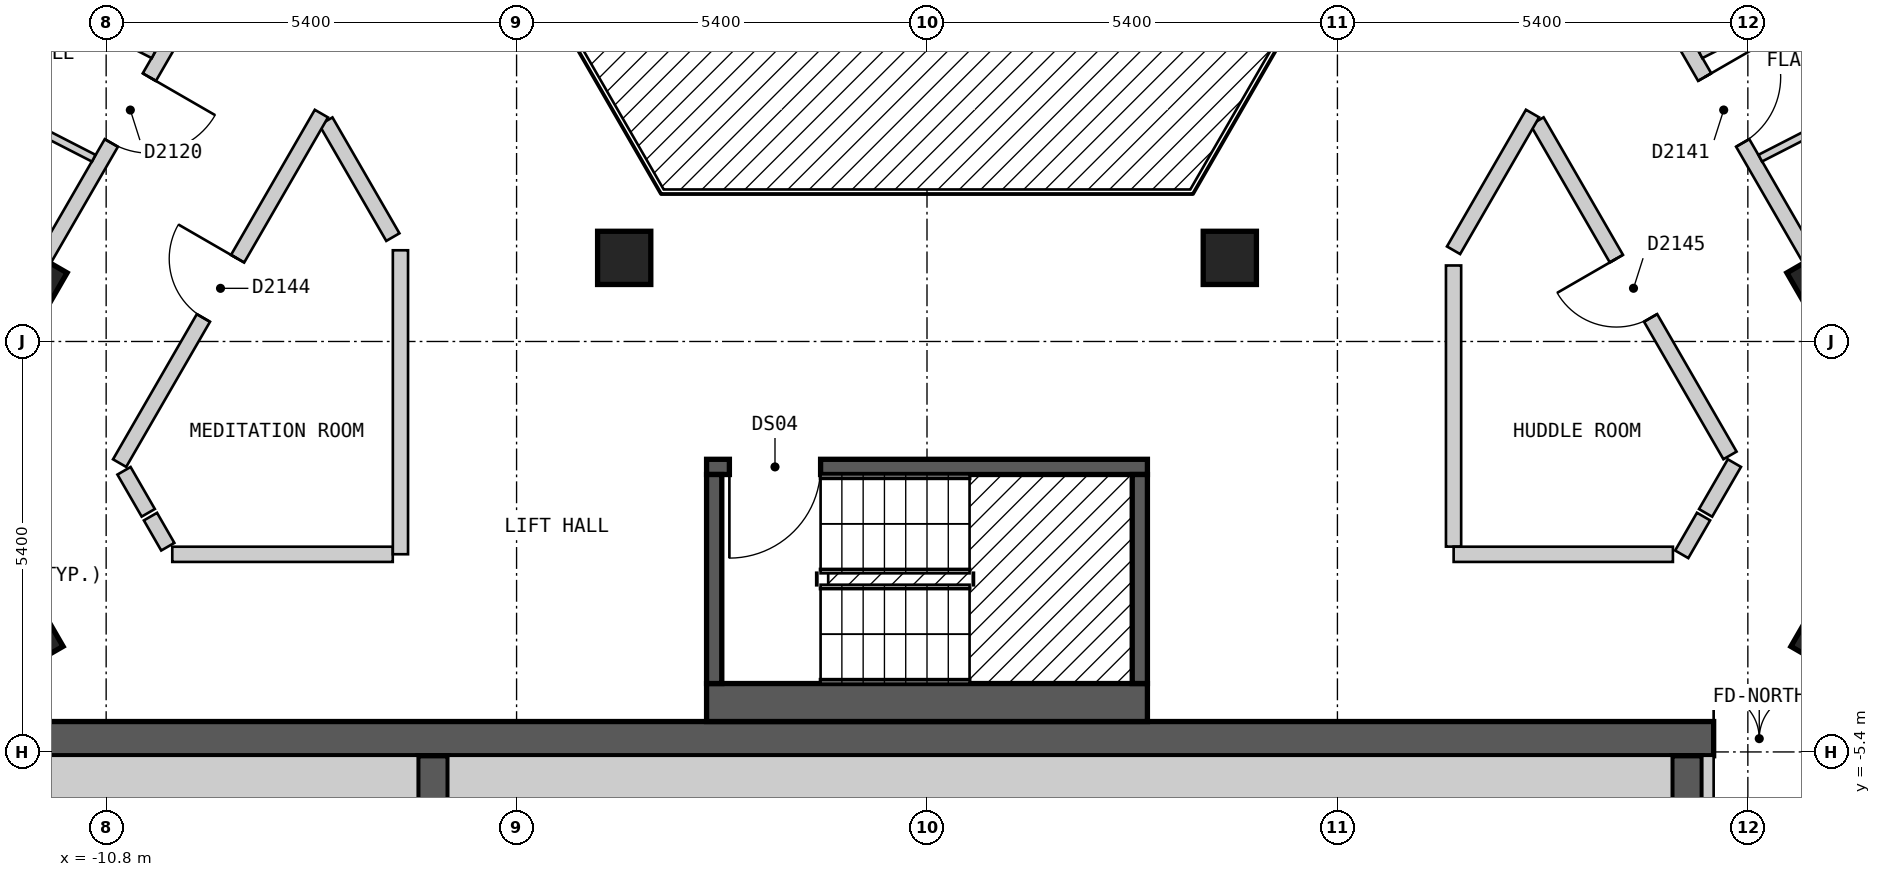
"""IFC4 building model, lengths in metres.
Left out: names, types, materials, properties, quantities, classifications, styles, units other than length and angle.
Written with IfcOpenShell. Run it as: python <this file> out.ifc"""

import sys

from ifc_helpers import new_model, si_unit, direction, frame, frame_2d, origin, origin_2d, place, context, subcontext, project, spatial, rectangle, extrude, element, fill, save


model = new_model("IFC4")
c1 = context("Model", 3, precision=1e-05, world=origin(), true_north=direction((0.0, 1.0)))
c2 = subcontext(c1, "Body", "Model", "MODEL_VIEW")
j1 = project(units=[si_unit("LENGTHUNIT", "METRE"), si_unit("PLANEANGLEUNIT", "RADIAN")], contexts=[c1])
p1 = place(None, origin())
s1 = spatial("IfcSite", under=j1, at=p1, CompositionType="ELEMENT")
p2 = place(p1, origin())
s2 = spatial("IfcBuilding", under=s1, at=p2, CompositionType="ELEMENT")
p3 = place(p2, frame((0.0, 0.0, 217.8)))
s3 = spatial("IfcBuildingStorey", under=s2, at=p3, CompositionType="ELEMENT", Elevation=217.8)
for number, where, z_axis, x_axis in (
    (1, (-11.845, -3.883, 0.0), (0.0, 0.0, 1.0), (0.5, -0.866, 0.0)),
    (2, (11.845, -3.884, 0.0), (0.0, 0.0, 1.0), (0.5, 0.866, 0.0)),
    (3, (11.792, 0.775, 0.0), (0.0, 0.0, 1.0), (-0.5, 0.866, 0.0)),
    (4, (3.984, 1.1, 0.0), (0.0, 0.0, 1.0), (1.0, 0.0, 0.0)),
    (5, (-3.984, 1.1, 0.0), (0.0, 0.0, 1.0), (1.0, 0.0, 0.0)),
    (6, (-11.792, 0.775, 0.0), (0.0, 0.0, 1.0), (-0.5, -0.866, 0.0)),
):
    element("IfcColumn", number, at=place(p3, frame(where, z_axis=z_axis, x_axis=x_axis)), inside=s3, PredefinedType="COLUMN", context=c2, shape_type="SweptSolid", body=[
        extrude(rectangle(XDim=0.7, YDim=0.7, at=origin_2d()), origin(), (0.0, 0.0, 1.0), 3.0),
    ])
p4 = place(p3, frame((-13.3, -5.225, 0.0), z_axis=(0.0, 0.0, 1.0), x_axis=(1.0, 0.0, 0.0)))
e7 = element("IfcWall", 7, at=p4, inside=s3, PredefinedType="SHEAR", context=c2, shape_type="SweptSolid", body=[
    extrude(rectangle(XDim=26.6, YDim=0.45, at=frame_2d((13.3, 0.0))), origin(), (0.0, 0.0, 1.0), 2.7),
])
p5 = place(p4, frame((23.65, 0.0, 0.0)))
e8 = element("IfcOpeningElement", 8, at=p5, cuts=e7, PredefinedType="OPENING", context=c2, shape_type="SweptSolid", body=[
    extrude(rectangle(XDim=1.2, YDim=2.1, at=frame_2d((0.6, 1.05))), frame((0.0, 0.235, 0.0), z_axis=(0.0, -1.0, 0.0), x_axis=(1.0, 0.0, 0.0)), (0.0, 0.0, 1.0), 0.47),
])
for number, where, z_axis, x_axis in (
    (9, (-6.5, -9.15, 0.0), (0.0, 0.0, 1.0), (0.0, 1.0, 0.0)),
    (10, (10.0, -9.15, 0.0), (0.0, 0.0, 1.0), (0.0, 1.0, 0.0)),
):
    element("IfcWall", number, at=place(p3, frame(where, z_axis=z_axis, x_axis=x_axis)), inside=s3, PredefinedType="SHEAR", context=c2, shape_type="SweptSolid", body=[
        extrude(rectangle(XDim=3.7, YDim=0.4, at=frame_2d((1.85, 0.0))), origin(), (0.0, 0.0, 1.0), 2.7),
    ])
p6 = place(p3, frame((-2.9, -4.75, 0.0), z_axis=(0.0, 0.0, 1.0), x_axis=(1.0, 0.0, 0.0)))
e11 = element("IfcWall", 11, at=p6, inside=s3, PredefinedType="SOLIDWALL", context=c2, shape_type="SweptSolid", body=[
    extrude(rectangle(XDim=5.8, YDim=0.5, at=frame_2d((2.9, 0.0))), origin(), (0.0, 0.0, 1.0), 2.7),
])
p7 = place(p3, frame((-2.9, -1.65, 0.0), z_axis=(0.0, 0.0, 1.0), x_axis=(1.0, 0.0, 0.0)))
e12 = element("IfcWall", 12, at=p7, inside=s3, PredefinedType="SOLIDWALL", context=c2, shape_type="SweptSolid", body=[
    extrude(rectangle(XDim=5.8, YDim=0.2, at=frame_2d((2.9, 0.0))), origin(), (0.0, 0.0, 1.0), 2.7),
])
p8 = place(p7, frame((0.3, 0.0, 0.0)))
e13 = element("IfcOpeningElement", 13, at=p8, cuts=e12, PredefinedType="OPENING", context=c2, shape_type="SweptSolid", body=[
    extrude(rectangle(XDim=1.2, YDim=2.1, at=frame_2d((0.6, 1.05))), frame((0.0, 0.11, 0.0), z_axis=(0.0, -1.0, 0.0), x_axis=(1.0, 0.0, 0.0)), (0.0, 0.0, 1.0), 0.22),
])
for number, where, z_axis, x_axis in (
    (14, (-2.8, -4.5, 0.0), (0.0, 0.0, 1.0), (0.0, 1.0, 0.0)),
    (15, (2.8, -4.5, 0.0), (0.0, 0.0, 1.0), (0.0, 1.0, 0.0)),
):
    element("IfcWall", number, at=place(p3, frame(where, z_axis=z_axis, x_axis=x_axis)), inside=s3, PredefinedType="SOLIDWALL", context=c2, shape_type="SweptSolid", body=[
        extrude(rectangle(XDim=2.75, YDim=0.2, at=frame_2d((1.375, 0.0))), origin(), (0.0, 0.0, 1.0), 2.7),
    ])
p9 = place(p3, frame((-7.909, 2.898, 0.0), z_axis=(0.0, 0.0, 1.0), x_axis=(0.50019444547, -0.865913111531, 0.0)))
e16 = element("IfcWall", 16, at=p9, inside=s3, PredefinedType="PARTITIONING", context=c2, shape_type="SweptSolid", body=[
    extrude(rectangle(XDim=1.761, YDim=0.2, at=frame_2d((0.88, 0.0))), origin(), (0.0, 0.0, 1.0), 2.7),
])
p10 = place(p3, frame((-10.565, -1.701, 0.0), z_axis=(0.0, 0.0, 1.0), x_axis=(0.499512735409, -0.866306543416, 0.0)))
e17 = element("IfcWall", 17, at=p10, inside=s3, PredefinedType="PARTITIONING", context=c2, shape_type="SweptSolid", body=[
    extrude(rectangle(XDim=0.638, YDim=0.2, at=frame_2d((0.319, 0.0))), origin(), (0.0, 0.0, 1.0), 2.7),
])
p11 = place(p3, frame((-10.217, -2.304, 0.0), z_axis=(0.0, 0.0, 1.0), x_axis=(0.499013081552, -0.866594452117, 0.0)))
e18 = element("IfcWall", 18, at=p11, inside=s3, PredefinedType="PARTITIONING", context=c2, shape_type="SweptSolid", body=[
    extrude(rectangle(XDim=0.457, YDim=0.2, at=frame_2d((0.229, 0.0))), origin(), (0.0, 0.0, 1.0), 2.7),
])
p12 = place(p3, frame((8.026, 2.899, 0.0), z_axis=(0.0, 0.0, 1.0), x_axis=(0.499986018985, -0.866033475577, 0.0)))
e19 = element("IfcWall", 19, at=p12, inside=s3, PredefinedType="PARTITIONING", context=c2, shape_type="SweptSolid", body=[
    extrude(rectangle(XDim=5.078, YDim=0.2, at=frame_2d((2.539, 0.0))), origin(), (0.0, 0.0, 1.0), 2.7),
])
p13 = place(p12, frame((2.089, 0.0, 0.0)))
e20 = element("IfcOpeningElement", 20, at=p13, cuts=e19, PredefinedType="OPENING", context=c2, shape_type="SweptSolid", body=[
    extrude(rectangle(XDim=0.9, YDim=2.1, at=frame_2d((0.45, 1.05))), frame((0.0, 0.11, 0.0), z_axis=(0.0, -1.0, 0.0), x_axis=(1.0, 0.0, 0.0)), (0.0, 0.0, 1.0), 0.22),
])
p14 = place(p3, frame((9.238, 5.2, 0.0), z_axis=(0.0, 0.0, 1.0), x_axis=(0.500025705601, -0.86601056214, 0.0)))
e21 = element("IfcWall", 21, at=p14, inside=s3, PredefinedType="PARTITIONING", context=c2, shape_type="SweptSolid", body=[
    extrude(rectangle(XDim=7.735, YDim=0.2, at=frame_2d((3.868, 0.0))), origin(), (0.0, 0.0, 1.0), 2.7),
])
p15 = place(p14, frame((6.705, 0.0, 0.0)))
e22 = element("IfcOpeningElement", 22, at=p15, cuts=e21, PredefinedType="OPENING", context=c2, shape_type="SweptSolid", body=[
    extrude(rectangle(XDim=1.0, YDim=2.1, at=frame_2d((0.5, 1.05))), frame((0.0, 0.11, 0.0), z_axis=(0.0, -1.0, 0.0), x_axis=(1.0, 0.0, 0.0)), (0.0, 0.0, 1.0), 0.22),
])
p16 = place(p14, frame((1.988, 0.0, 0.0)))
e23 = element("IfcOpeningElement", 23, at=p16, cuts=e21, PredefinedType="OPENING", context=c2, shape_type="SweptSolid", body=[
    extrude(rectangle(XDim=1.0, YDim=2.1, at=frame_2d((0.5, 1.05))), frame((0.0, 0.11, 0.0), z_axis=(0.0, -1.0, 0.0), x_axis=(1.0, 0.0, 0.0)), (0.0, 0.0, 1.0), 0.22),
])
p17 = place(p3, frame((6.928, 1.0, 0.0), z_axis=(0.0, 0.0, 1.0), x_axis=(0.0, -1.0, 0.0)))
e24 = element("IfcWall", 24, at=p17, inside=s3, PredefinedType="PARTITIONING", context=c2, shape_type="SweptSolid", body=[
    extrude(rectangle(XDim=3.699, YDim=0.2, at=frame_2d((1.85, 0.0))), origin(), (0.0, 0.0, 1.0), 2.7),
])
p18 = place(p3, frame((-9.93, -2.8, 0.0), z_axis=(0.0, 0.0, 1.0), x_axis=(1.0, 0.0, 0.0)))
e25 = element("IfcWall", 25, at=p18, inside=s3, PredefinedType="PARTITIONING", context=c2, shape_type="SweptSolid", body=[
    extrude(rectangle(XDim=2.901, YDim=0.2, at=frame_2d((1.45, 0.0))), origin(), (0.0, 0.0, 1.0), 2.7),
])
p19 = place(p3, frame((6.929, -2.8, 0.0), z_axis=(0.0, 0.0, 1.0), x_axis=(1.0, 0.0, 0.0)))
e26 = element("IfcWall", 26, at=p19, inside=s3, PredefinedType="PARTITIONING", context=c2, shape_type="SweptSolid", body=[
    extrude(rectangle(XDim=2.885, YDim=0.2, at=frame_2d((1.442, 0.0))), origin(), (0.0, 0.0, 1.0), 2.7),
])
p20 = place(p3, frame((6.928, 1.2, 0.0), z_axis=(0.0, 0.0, 1.0), x_axis=(0.500132712588, 0.865948768577, 0.0)))
e27 = element("IfcWall", 27, at=p20, inside=s3, PredefinedType="PARTITIONING", context=c2, shape_type="SweptSolid", body=[
    extrude(rectangle(XDim=2.078, YDim=0.2, at=frame_2d((1.039, 0.0))), origin(), (0.0, 0.0, 1.0), 2.7),
])
p21 = place(p3, frame((9.93, -2.8, 0.0), z_axis=(0.0, 0.0, 1.0), x_axis=(0.500164219654, 0.865930570761, 0.0)))
e28 = element("IfcWall", 28, at=p21, inside=s3, PredefinedType="PARTITIONING", context=c2, shape_type="SweptSolid", body=[
    extrude(rectangle(XDim=0.574, YDim=0.2, at=frame_2d((0.287, 0.0))), origin(), (0.0, 0.0, 1.0), 2.7),
])
p22 = place(p3, frame((10.244, -2.255, 0.0), z_axis=(0.0, 0.0, 1.0), x_axis=(0.50109986513, 0.865389464442, 0.0)))
e29 = element("IfcWall", 29, at=p22, inside=s3, PredefinedType="PARTITIONING", context=c2, shape_type="SweptSolid", body=[
    extrude(rectangle(XDim=0.757, YDim=0.2, at=frame_2d((0.378, 0.0))), origin(), (0.0, 0.0, 1.0), 2.7),
])
p23 = place(p3, frame((-10.623, -1.6, 0.0), z_axis=(0.0, 0.0, 1.0), x_axis=(0.500040865889, 0.866001808567, 0.0)))
e30 = element("IfcWall", 30, at=p23, inside=s3, PredefinedType="PARTITIONING", context=c2, shape_type="SweptSolid", body=[
    extrude(rectangle(XDim=5.31, YDim=0.2, at=frame_2d((2.655, 0.0))), origin(), (0.0, 0.0, 1.0), 2.7),
])
p24 = place(p23, frame((2.205, 0.0, 0.0)))
e31 = element("IfcOpeningElement", 31, at=p24, cuts=e30, PredefinedType="OPENING", context=c2, shape_type="SweptSolid", body=[
    extrude(rectangle(XDim=0.9, YDim=2.1, at=frame_2d((0.45, 1.05))), frame((0.0, 0.11, 0.0), z_axis=(0.0, -1.0, 0.0), x_axis=(1.0, 0.0, 0.0)), (0.0, 0.0, 1.0), 0.22),
])
p25 = place(p3, frame((-13.106, -1.5, 0.0), z_axis=(0.0, 0.0, 1.0), x_axis=(0.500025705601, 0.86601056214, 0.0)))
e32 = element("IfcWall", 32, at=p25, inside=s3, PredefinedType="PARTITIONING", context=c2, shape_type="SweptSolid", body=[
    extrude(rectangle(XDim=7.735, YDim=0.2, at=frame_2d((3.868, 0.0))), origin(), (0.0, 0.0, 1.0), 2.7),
])
p26 = place(p25, frame((4.748, 0.0, 0.0)))
e33 = element("IfcOpeningElement", 33, at=p26, cuts=e32, PredefinedType="OPENING", context=c2, shape_type="SweptSolid", body=[
    extrude(rectangle(XDim=1.0, YDim=2.1, at=frame_2d((0.5, 1.05))), frame((0.0, 0.11, 0.0), z_axis=(0.0, -1.0, 0.0), x_axis=(1.0, 0.0, 0.0)), (0.0, 0.0, 1.0), 0.22),
])
p27 = place(p3, frame((-6.928, -2.799, 0.0), z_axis=(0.0, 0.0, 1.0), x_axis=(0.0, 1.0, 0.0)))
e34 = element("IfcWall", 34, at=p27, inside=s3, PredefinedType="PARTITIONING", context=c2, shape_type="SweptSolid", body=[
    extrude(rectangle(XDim=3.999, YDim=0.2, at=frame_2d((2.0, 0.0))), origin(), (0.0, 0.0, 1.0), 2.7),
])
p28 = place(p3, frame((-12.917, 5.177, 0.0), z_axis=(0.0, 0.0, 1.0), x_axis=(0.889829844516, -0.456292502467, 0.0)))
e35 = element("IfcWall", 35, at=p28, inside=s3, PredefinedType="PARTITIONING", context=c2, shape_type="SweptSolid", body=[
    extrude(rectangle(XDim=3.079, YDim=0.1, at=frame_2d((1.54, 0.0))), origin(), (0.0, 0.0, 1.0), 2.7),
])
p29 = place(p28, frame((1.114, 0.0, 0.0)))
e36 = element("IfcOpeningElement", 36, at=p29, cuts=e35, PredefinedType="OPENING", context=c2, shape_type="SweptSolid", body=[
    extrude(rectangle(XDim=0.9, YDim=2.1, at=frame_2d((0.45, 1.05))), frame((0.0, 0.06, 0.0), z_axis=(0.0, -1.0, 0.0), x_axis=(1.0, 0.0, 0.0)), (0.0, 0.0, 1.0), 0.12),
])
p30 = place(p3, frame((-13.634, 3.78, 0.0), z_axis=(0.0, 0.0, 1.0), x_axis=(0.889908901513, -0.456138298116, 0.0)))
e37 = element("IfcWall", 37, at=p30, inside=s3, PredefinedType="PARTITIONING", context=c2, shape_type="SweptSolid", body=[
    extrude(rectangle(XDim=3.002, YDim=0.1, at=frame_2d((1.501, 0.0))), origin(), (0.0, 0.0, 1.0), 2.7),
])
p31 = place(p30, frame((1.126, 0.0, 0.0)))
e38 = element("IfcOpeningElement", 38, at=p31, cuts=e37, PredefinedType="OPENING", context=c2, shape_type="SweptSolid", body=[
    extrude(rectangle(XDim=0.8, YDim=2.1, at=frame_2d((0.4, 1.05))), frame((0.0, 0.06, 0.0), z_axis=(0.0, -1.0, 0.0), x_axis=(1.0, 0.0, 0.0)), (0.0, 0.0, 1.0), 0.12),
])
p32 = place(p3, frame((10.178, 3.772, 0.0), z_axis=(0.0, 0.0, 1.0), x_axis=(0.889732071959, 0.456483121405, 0.0)))
e39 = element("IfcWall", 39, at=p32, inside=s3, PredefinedType="PARTITIONING", context=c2, shape_type="SweptSolid", body=[
    extrude(rectangle(XDim=2.679, YDim=0.1, at=frame_2d((1.34, 0.0))), origin(), (0.0, 0.0, 1.0), 2.7),
])
p33 = place(p32, frame((0.915, 0.0, 0.0)))
e40 = element("IfcOpeningElement", 40, at=p33, cuts=e39, PredefinedType="OPENING", context=c2, shape_type="SweptSolid", body=[
    extrude(rectangle(XDim=0.8, YDim=2.1, at=frame_2d((0.4, 1.05))), frame((0.0, 0.06, 0.0), z_axis=(0.0, -1.0, 0.0), x_axis=(1.0, 0.0, 0.0)), (0.0, 0.0, 1.0), 0.12),
])
p34 = place(p3, frame((10.963, 2.412, 0.0), z_axis=(0.0, 0.0, 1.0), x_axis=(0.889943997558, 0.456069820543, 0.0)))
e41 = element("IfcWall", 41, at=p34, inside=s3, PredefinedType="PARTITIONING", context=c2, shape_type="SweptSolid", body=[
    extrude(rectangle(XDim=2.651, YDim=0.1, at=frame_2d((1.325, 0.0))), origin(), (0.0, 0.0, 1.0), 2.7),
])
p35 = place(p34, frame((0.826, 0.0, 0.0)))
e42 = element("IfcOpeningElement", 42, at=p35, cuts=e41, PredefinedType="OPENING", context=c2, shape_type="SweptSolid", body=[
    extrude(rectangle(XDim=0.9, YDim=2.1, at=frame_2d((0.45, 1.05))), frame((0.0, 0.06, 0.0), z_axis=(0.0, -1.0, 0.0), x_axis=(1.0, 0.0, 0.0)), (0.0, 0.0, 1.0), 0.12),
])
p36 = place(p3, frame((-12.1, -5.825, 0.0), z_axis=(0.0, 0.0, 1.0), x_axis=(1.0, 0.0, 0.0)))
e43 = element("IfcWall", 43, at=p36, inside=s3, PredefinedType="SOLIDWALL", context=c2, shape_type="SweptSolid", body=[
    extrude(rectangle(XDim=5.4, YDim=0.75, at=frame_2d((2.7, 0.0))), origin(), (0.0, 0.0, 1.0), 2.7),
])
p37 = place(p3, frame((-6.3, -5.825, 0.0), z_axis=(0.0, 0.0, 1.0), x_axis=(1.0, 0.0, 0.0)))
e44 = element("IfcWall", 44, at=p37, inside=s3, PredefinedType="SOLIDWALL", context=c2, shape_type="SweptSolid", body=[
    extrude(rectangle(XDim=16.1, YDim=0.75, at=frame_2d((8.05, 0.0))), origin(), (0.0, 0.0, 1.0), 2.7),
])
p38 = place(p3, frame((10.275, -6.2, 0.0), z_axis=(0.0, 0.0, 1.0), x_axis=(0.0, 1.0, 0.0)))
e45 = element("IfcWall", 45, at=p38, inside=s3, PredefinedType="PARTITIONING", context=c2, shape_type="SweptSolid", body=[
    extrude(rectangle(XDim=0.75, YDim=0.15, at=frame_2d((0.375, 0.0))), origin(), (0.0, 0.0, 1.0), 2.7),
])
p39 = place(p8, origin())
e46 = element("IfcDoor", 46, at=p39, inside=s3, OperationType="SINGLE_SWING_LEFT", PredefinedType="DOOR", context=c2, shape_type="SweptSolid", body=[
    extrude(rectangle(XDim=1.2, YDim=2.1, at=frame_2d((0.6, 1.05))), frame((0.0, 0.025, 0.0), z_axis=(0.0, -1.0, 0.0), x_axis=(1.0, 0.0, 0.0)), (0.0, 0.0, 1.0), 0.05),
])
fill(e13, e46)
p40 = place(p26, origin())
e47 = element("IfcDoor", 47, at=p40, inside=s3, OperationType="SINGLE_SWING_RIGHT", PredefinedType="DOOR", context=c2, shape_type="SweptSolid", body=[
    extrude(rectangle(XDim=1.0, YDim=2.1, at=frame_2d((0.5, 1.05))), frame((0.0, 0.025, 0.0), z_axis=(0.0, -1.0, 0.0), x_axis=(1.0, 0.0, 0.0)), (0.0, 0.0, 1.0), 0.05),
])
fill(e33, e47)
p41 = place(p16, origin())
e48 = element("IfcDoor", 48, at=p41, inside=s3, OperationType="SINGLE_SWING_LEFT", PredefinedType="DOOR", context=c2, shape_type="SweptSolid", body=[
    extrude(rectangle(XDim=1.0, YDim=2.1, at=frame_2d((0.5, 1.05))), frame((0.0, 0.025, 0.0), z_axis=(0.0, -1.0, 0.0), x_axis=(1.0, 0.0, 0.0)), (0.0, 0.0, 1.0), 0.05),
])
fill(e23, e48)
p42 = place(p24, origin())
e49 = element("IfcDoor", 49, at=p42, inside=s3, OperationType="SINGLE_SWING_RIGHT", PredefinedType="DOOR", context=c2, shape_type="SweptSolid", body=[
    extrude(rectangle(XDim=0.9, YDim=2.1, at=frame_2d((0.45, 1.05))), frame((0.0, 0.025, 0.0), z_axis=(0.0, -1.0, 0.0), x_axis=(1.0, 0.0, 0.0)), (0.0, 0.0, 1.0), 0.05),
])
fill(e31, e49)
p43 = place(p13, origin())
e50 = element("IfcDoor", 50, at=p43, inside=s3, OperationType="SINGLE_SWING_LEFT", PredefinedType="DOOR", context=c2, shape_type="SweptSolid", body=[
    extrude(rectangle(XDim=0.9, YDim=2.1, at=frame_2d((0.45, 1.05))), frame((0.0, 0.025, 0.0), z_axis=(0.0, -1.0, 0.0), x_axis=(1.0, 0.0, 0.0)), (0.0, 0.0, 1.0), 0.05),
])
fill(e20, e50)
p44 = place(p5, origin())
e51 = element("IfcDoor", 51, at=p44, inside=s3, OperationType="DOUBLE_DOOR_SINGLE_SWING", PredefinedType="DOOR", context=c2, shape_type="SweptSolid", body=[
    extrude(rectangle(XDim=1.2, YDim=2.1, at=frame_2d((0.6, 1.05))), frame((0.0, 0.025, 0.0), z_axis=(0.0, -1.0, 0.0), x_axis=(1.0, 0.0, 0.0)), (0.0, 0.0, 1.0), 0.05),
])
fill(e8, e51)
save(model, sys.argv[1])
